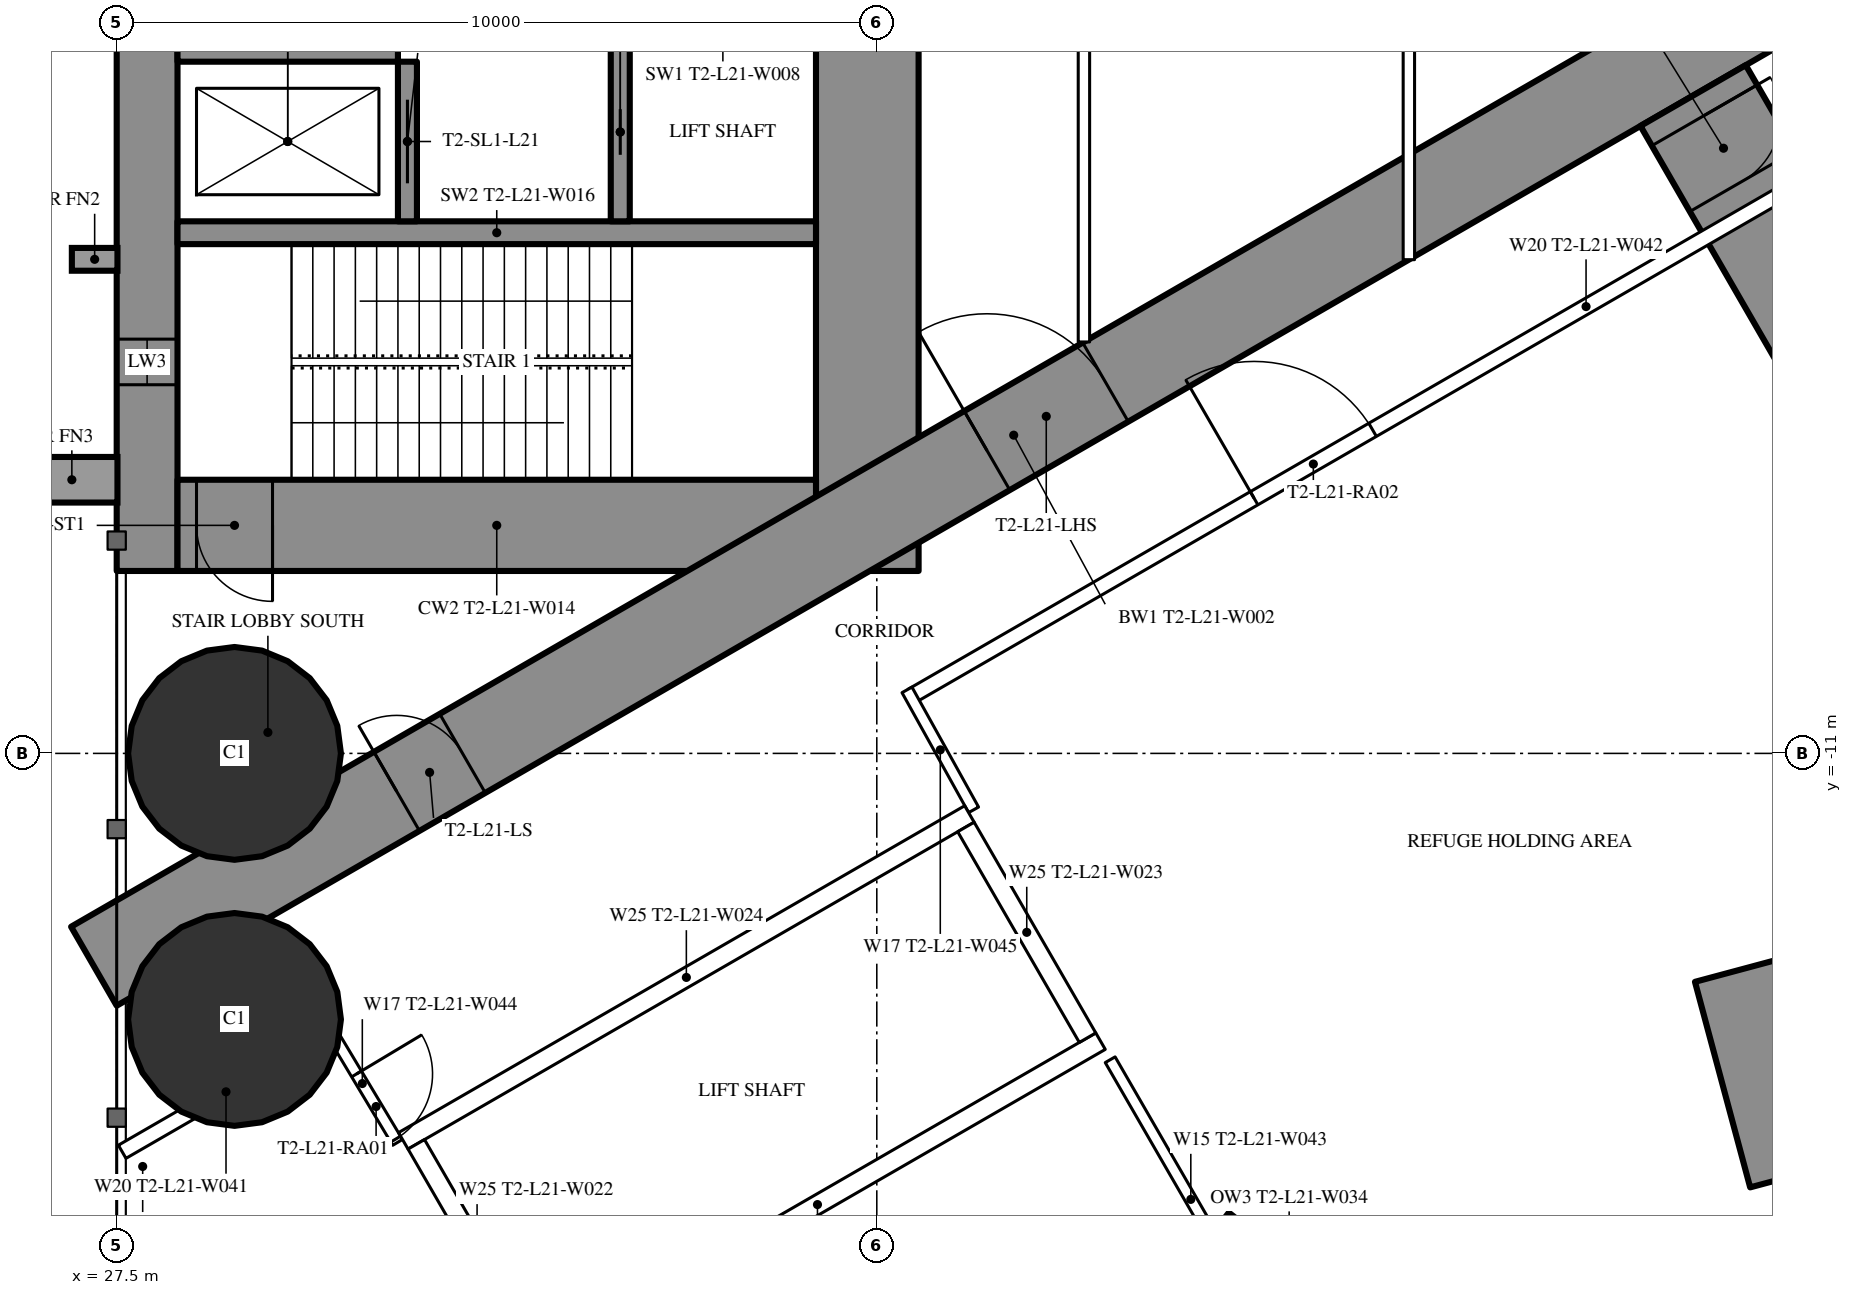
"""IFC4 building model, lengths in metres.
Left out: names, types, materials, properties, quantities, classifications, styles, units other than length and angle.
Written with IfcOpenShell. Run it as: python <this file> out.ifc"""

import sys

from ifc_helpers import new_model, si_unit, direction, frame, frame_2d, origin, origin_2d, place, context, subcontext, project, spatial, rectangle, hollow_circle, extrude, element, fill, save


model = new_model("IFC4")
c1 = context("Model", 3, precision=1e-05, world=origin(), true_north=direction((0.0, 1.0)))
c2 = subcontext(c1, "Body", "Model", "MODEL_VIEW")
j1 = project(units=[si_unit("LENGTHUNIT", "METRE"), si_unit("PLANEANGLEUNIT", "RADIAN")], contexts=[c1])
p1 = place(None, origin())
s1 = spatial("IfcSite", under=j1, at=p1, CompositionType="ELEMENT")
p2 = place(p1, origin())
s2 = spatial("IfcBuilding", under=s1, at=p2, CompositionType="ELEMENT")
p3 = place(p2, frame((0.0, 0.0, 81.0)))
s3 = spatial("IfcBuildingStorey", under=s2, at=p3, CompositionType="ELEMENT", Elevation=81.0)
for number, where, z_axis, x_axis in (
    (1, (29.05, -11.0, 0.0), (0.0, 0.0, 1.0), (1.0, 0.0, 0.0)),
    (2, (29.05, -14.5, 0.0), (0.0, 0.0, 1.0), (1.0, 0.0, 0.0)),
):
    element("IfcColumn", number, at=place(p3, frame(where, z_axis=z_axis, x_axis=x_axis)), inside=s3, PredefinedType="COLUMN", context=c2, shape_type="SweptSolid", body=[
        extrude(hollow_circle(Radius=1.4, WallThickness=0.12, at=origin_2d()), origin(), (0.0, 0.0, 1.0), 6.0),
    ])
p4 = place(p3, frame((44.584, -20.752, 0.0), z_axis=(0.0, 0.0, 1.0), x_axis=(-0.785936955348, 0.618306640931, 0.0)))
e3 = element("IfcWall", 3, at=p4, inside=s3, PredefinedType="SHEAR", context=c2, shape_type="SweptSolid", body=[
    extrude(rectangle(XDim=4.222, YDim=2.8, at=frame_2d((2.111, 0.0))), origin(), (0.0, 0.0, 1.0), 6.0),
])
p5 = place(p3, frame((56.147, -13.337, 0.0), z_axis=(0.0, 0.0, 1.0), x_axis=(-0.965766047912, -0.259414611578, 0.0)))
e4 = element("IfcWall", 4, at=p5, inside=s3, PredefinedType="SHEAR", context=c2, shape_type="SweptSolid", body=[
    extrude(rectangle(XDim=7.787, YDim=2.8, at=frame_2d((3.894, 0.0))), origin(), (0.0, 0.0, 1.0), 6.0),
])
p6 = place(p3, frame((27.9, -8.6, 0.0), z_axis=(0.0, 0.0, 1.0), x_axis=(0.0, 1.0, 0.0)))
e5 = element("IfcWall", 5, at=p6, inside=s3, PredefinedType="SHEAR", context=c2, shape_type="SweptSolid", body=[
    extrude(rectangle(XDim=17.2, YDim=0.8, at=frame_2d((8.6, 0.0))), origin(), (0.0, 0.0, 1.0), 6.0),
])
p7 = place(p6, frame((2.45, 0.0, 0.6)))
e6 = element("IfcOpeningElement", 6, at=p7, cuts=e5, PredefinedType="OPENING", context=c2, shape_type="SweptSolid", body=[
    extrude(rectangle(XDim=0.6, YDim=4.5, at=frame_2d((0.3, 2.25))), frame((0.0, 0.41, 0.0), z_axis=(0.0, -1.0, 0.0), x_axis=(1.0, 0.0, 0.0)), (0.0, 0.0, 1.0), 0.82),
])
p8 = place(p6, frame((14.15, 0.0, 0.6)))
e7 = element("IfcOpeningElement", 7, at=p8, cuts=e5, PredefinedType="OPENING", context=c2, shape_type="SweptSolid", body=[
    extrude(rectangle(XDim=0.6, YDim=4.5, at=frame_2d((0.3, 2.25))), frame((0.0, 0.41, 0.0), z_axis=(0.0, -1.0, 0.0), x_axis=(1.0, 0.0, 0.0)), (0.0, 0.0, 1.0), 0.82),
])
p9 = place(p3, frame((37.375, -8.6, 0.0), z_axis=(0.0, 0.0, 1.0), x_axis=(0.0, 1.0, 0.0)))
e8 = element("IfcWall", 8, at=p9, inside=s3, PredefinedType="SHEAR", context=c2, shape_type="SweptSolid", body=[
    extrude(rectangle(XDim=17.2, YDim=1.35, at=frame_2d((8.6, 0.0))), origin(), (0.0, 0.0, 1.0), 6.0),
])
p10 = place(p9, frame((7.7, 0.0, 0.0)))
e9 = element("IfcOpeningElement", 9, at=p10, cuts=e8, PredefinedType="OPENING", context=c2, shape_type="SweptSolid", body=[
    extrude(rectangle(XDim=1.8, YDim=2.2, at=frame_2d((0.9, 1.1))), frame((0.0, 0.685, 0.0), z_axis=(0.0, -1.0, 0.0), x_axis=(1.0, 0.0, 0.0)), (0.0, 0.0, 1.0), 1.37),
])
p11 = place(p3, frame((28.3, -8.0, 0.0), z_axis=(0.0, 0.0, 1.0), x_axis=(1.0, 0.0, 0.0)))
e10 = element("IfcWall", 10, at=p11, inside=s3, PredefinedType="SHEAR", context=c2, shape_type="SweptSolid", body=[
    extrude(rectangle(XDim=8.4, YDim=1.2, at=frame_2d((4.2, 0.0))), origin(), (0.0, 0.0, 1.0), 6.0),
])
p12 = place(p11, frame((0.25, 0.0, 0.0)))
e11 = element("IfcOpeningElement", 11, at=p12, cuts=e10, PredefinedType="OPENING", context=c2, shape_type="SweptSolid", body=[
    extrude(rectangle(XDim=1.0, YDim=2.2, at=frame_2d((0.5, 1.1))), frame((0.0, 0.61, 0.0), z_axis=(0.0, -1.0, 0.0), x_axis=(1.0, 0.0, 0.0)), (0.0, 0.0, 1.0), 1.22),
])
p13 = place(p3, frame((28.3, -4.15, 0.0), z_axis=(0.0, 0.0, 1.0), x_axis=(1.0, 0.0, 0.0)))
e12 = element("IfcWall", 12, at=p13, inside=s3, PredefinedType="SHEAR", context=c2, shape_type="SweptSolid", body=[
    extrude(rectangle(XDim=8.4, YDim=0.3, at=frame_2d((4.2, 0.0))), origin(), (0.0, 0.0, 1.0), 6.0),
])
p14 = place(p3, frame((31.325, -4.0, 0.0), z_axis=(0.0, 0.0, 1.0), x_axis=(0.0, 1.0, 0.0)))
e13 = element("IfcWall", 13, at=p14, inside=s3, PredefinedType="SHEAR", context=c2, shape_type="SweptSolid", body=[
    extrude(rectangle(XDim=2.1, YDim=0.25, at=frame_2d((1.05, 0.0))), origin(), (0.0, 0.0, 1.0), 6.0),
])
p15 = place(p14, frame((0.5, 0.0, 0.0)))
e14 = element("IfcOpeningElement", 14, at=p15, cuts=e13, PredefinedType="OPENING", context=c2, shape_type="SweptSolid", body=[
    extrude(rectangle(XDim=1.1, YDim=2.2, at=frame_2d((0.55, 1.1))), frame((0.0, 0.135, 0.0), z_axis=(0.0, -1.0, 0.0), x_axis=(1.0, 0.0, 0.0)), (0.0, 0.0, 1.0), 0.27),
])
p16 = place(p3, frame((34.125, -4.0, 0.0), z_axis=(0.0, 0.0, 1.0), x_axis=(0.0, 1.0, 0.0)))
e15 = element("IfcWall", 15, at=p16, inside=s3, PredefinedType="SHEAR", context=c2, shape_type="SweptSolid", body=[
    extrude(rectangle(XDim=2.35, YDim=0.25, at=frame_2d((1.175, 0.0))), origin(), (0.0, 0.0, 1.0), 6.0),
])
p17 = place(p16, frame((0.875, 0.0, 0.0)))
e16 = element("IfcOpeningElement", 16, at=p17, cuts=e15, PredefinedType="OPENING", context=c2, shape_type="SweptSolid", body=[
    extrude(rectangle(XDim=0.6, YDim=2.0, at=frame_2d((0.3, 1.0))), frame((0.0, 0.135, 0.0), z_axis=(0.0, -1.0, 0.0), x_axis=(1.0, 0.0, 0.0)), (0.0, 0.0, 1.0), 0.27),
])
p18 = place(p3, frame((28.3, -1.775, 0.0), z_axis=(0.0, 0.0, 1.0), x_axis=(1.0, 0.0, 0.0)))
e17 = element("IfcWall", 17, at=p18, inside=s3, PredefinedType="SHEAR", context=c2, shape_type="SweptSolid", body=[
    extrude(rectangle(XDim=2.9, YDim=0.25, at=frame_2d((1.45, 0.0))), origin(), (0.0, 0.0, 1.0), 6.0),
])
p19 = place(p3, frame((27.2, -13.8, 0.0), z_axis=(0.0, 0.0, 1.0), x_axis=(0.866027159892, 0.499996958321, 0.0)))
e18 = element("IfcWall", 18, at=p19, inside=s3, PredefinedType="SHEAR", context=c2, shape_type="SweptSolid", body=[
    extrude(rectangle(XDim=27.947, YDim=1.2, at=frame_2d((13.973, 0.0))), origin(), (0.0, 0.0, 1.0), 6.0),
])
p20 = place(p19, frame((4.6, 0.0, 0.0)))
e19 = element("IfcOpeningElement", 19, at=p20, cuts=e18, PredefinedType="OPENING", context=c2, shape_type="SweptSolid", body=[
    extrude(rectangle(XDim=1.0, YDim=2.2, at=frame_2d((0.5, 1.1))), frame((0.0, 0.61, 0.0), z_axis=(0.0, -1.0, 0.0), x_axis=(1.0, 0.0, 0.0)), (0.0, 0.0, 1.0), 1.22),
])
p21 = place(p19, frame((13.568, 0.0, 0.0)))
e20 = element("IfcOpeningElement", 20, at=p21, cuts=e18, PredefinedType="OPENING", context=c2, shape_type="SweptSolid", body=[
    extrude(rectangle(XDim=1.8, YDim=2.2, at=frame_2d((0.9, 1.1))), frame((0.0, 0.61, 0.0), z_axis=(0.0, -1.0, 0.0), x_axis=(1.0, 0.0, 0.0)), (0.0, 0.0, 1.0), 1.22),
])
p22 = place(p3, frame((48.239, -2.346, 0.0), z_axis=(0.0, 0.0, 1.0), x_axis=(0.500006130383, -0.866021864377, 0.0)))
e21 = element("IfcWall", 21, at=p22, inside=s3, PredefinedType="SHEAR", context=c2, shape_type="SweptSolid", body=[
    extrude(rectangle(XDim=13.112, YDim=1.6, at=frame_2d((6.556, 0.0))), origin(), (0.0, 0.0, 1.0), 6.0),
])
p23 = place(p22, frame((0.3, 0.0, 0.0)))
e22 = element("IfcOpeningElement", 22, at=p23, cuts=e21, PredefinedType="OPENING", context=c2, shape_type="SweptSolid", body=[
    extrude(rectangle(XDim=1.0, YDim=2.2, at=frame_2d((0.5, 1.1))), frame((0.0, 0.81, 0.0), z_axis=(0.0, -1.0, 0.0), x_axis=(1.0, 0.0, 0.0)), (0.0, 0.0, 1.0), 1.62),
])
p24 = place(p3, frame((40.57, -15.03, 0.0), z_axis=(0.0, 0.0, 1.0), x_axis=(0.500012993597, -0.866017901798, 0.0)))
e23 = element("IfcWall", 23, at=p24, inside=s3, PredefinedType="PARTITIONING", context=c2, shape_type="SweptSolid", body=[
    extrude(rectangle(XDim=4.243, YDim=0.15, at=frame_2d((2.122, 0.0))), origin(), (0.0, 0.0, 1.0), 5.75),
])
p25 = place(p3, frame((27.572, -16.241, 0.0), z_axis=(0.0, 0.0, 1.0), x_axis=(0.866029654818, 0.499992636921, 0.0)))
e24 = element("IfcWall", 24, at=p25, inside=s3, PredefinedType="PARTITIONING", context=c2, shape_type="SweptSolid", body=[
    extrude(rectangle(XDim=3.155, YDim=0.2, at=frame_2d((1.577, 0.0))), origin(), (0.0, 0.0, 1.0), 5.75),
])
p26 = place(p3, frame((37.96, -10.243, 0.0), z_axis=(0.0, 0.0, 1.0), x_axis=(0.866026429433, 0.499998223521, 0.0)))
e25 = element("IfcWall", 25, at=p26, inside=s3, PredefinedType="PARTITIONING", context=c2, shape_type="SweptSolid", body=[
    extrude(rectangle(XDim=20.487, YDim=0.2, at=frame_2d((10.243, 0.0))), origin(), (0.0, 0.0, 1.0), 5.75),
])
p27 = place(p26, frame((14.943, 0.0, 0.0)))
e26 = element("IfcOpeningElement", 26, at=p27, cuts=e25, PredefinedType="OPENING", context=c2, shape_type="SweptSolid", body=[
    extrude(rectangle(XDim=1.8, YDim=2.2, at=frame_2d((0.9, 1.1))), frame((0.0, 0.11, 0.0), z_axis=(0.0, -1.0, 0.0), x_axis=(1.0, 0.0, 0.0)), (0.0, 0.0, 1.0), 0.22),
])
p28 = place(p26, frame((5.2, 0.0, 0.0)))
e27 = element("IfcOpeningElement", 27, at=p28, cuts=e25, PredefinedType="OPENING", context=c2, shape_type="SweptSolid", body=[
    extrude(rectangle(XDim=1.8, YDim=2.2, at=frame_2d((0.9, 1.1))), frame((0.0, 0.11, 0.0), z_axis=(0.0, -1.0, 0.0), x_axis=(1.0, 0.0, 0.0)), (0.0, 0.0, 1.0), 0.22),
])
p29 = place(p3, frame((30.267, -14.569, 0.0), z_axis=(0.0, 0.0, 1.0), x_axis=(0.514336634837, -0.857588377991, 0.0)))
e28 = element("IfcWall", 28, at=p29, inside=s3, PredefinedType="PARTITIONING", context=c2, shape_type="SweptSolid", body=[
    extrude(rectangle(XDim=1.805, YDim=0.15, at=frame_2d((0.903, 0.0))), origin(), (0.0, 0.0, 1.0), 2.75),
])
p30 = place(p29, frame((0.755, 0.0, 0.0)))
e29 = element("IfcOpeningElement", 29, at=p30, cuts=e28, PredefinedType="OPENING", context=c2, shape_type="SweptSolid", body=[
    extrude(rectangle(XDim=1.0, YDim=2.2, at=frame_2d((0.5, 1.1))), frame((0.0, 0.085, 0.0), z_axis=(0.0, -1.0, 0.0), x_axis=(1.0, 0.0, 0.0)), (0.0, 0.0, 1.0), 0.17),
])
p31 = place(p3, frame((38.773, -11.742, 0.0), z_axis=(0.0, 0.0, 1.0), x_axis=(-0.485528096672, 0.8742210632, 0.0)))
e30 = element("IfcWall", 30, at=p31, inside=s3, PredefinedType="PARTITIONING", context=c2, shape_type="SweptSolid", body=[
    extrude(rectangle(XDim=1.805, YDim=0.15, at=frame_2d((0.903, 0.0))), origin(), (0.0, 0.0, 1.0), 5.75),
])
p32 = place(p3, frame((40.225, -5.587, 0.0), z_axis=(0.0, 0.0, 1.0), x_axis=(0.0, 1.0, 0.0)))
e31 = element("IfcWall", 31, at=p32, inside=s3, PredefinedType="PARTITIONING", context=c2, shape_type="SweptSolid", body=[
    extrude(rectangle(XDim=11.174, YDim=0.15, at=frame_2d((5.587, 0.0))), origin(), (0.0, 0.0, 1.0), 5.75),
])
p33 = place(p32, frame((4.687, 0.0, 0.0)))
e32 = element("IfcOpeningElement", 32, at=p33, cuts=e31, PredefinedType="OPENING", context=c2, shape_type="SweptSolid", body=[
    extrude(rectangle(XDim=1.8, YDim=2.2, at=frame_2d((0.9, 1.1))), frame((0.0, 0.085, 0.0), z_axis=(0.0, -1.0, 0.0), x_axis=(1.0, 0.0, 0.0)), (0.0, 0.0, 1.0), 0.17),
])
p34 = place(p3, frame((44.5, -4.505, 0.0), z_axis=(0.0, 0.0, 1.0), x_axis=(0.0, 1.0, 0.0)))
e33 = element("IfcWall", 33, at=p34, inside=s3, PredefinedType="PARTITIONING", context=c2, shape_type="SweptSolid", body=[
    extrude(rectangle(XDim=9.009, YDim=0.15, at=frame_2d((4.505, 0.0))), origin(), (0.0, 0.0, 1.0), 5.75),
])
p35 = place(p34, frame((4.005, 0.0, 0.0)))
e34 = element("IfcOpeningElement", 34, at=p35, cuts=e33, PredefinedType="OPENING", context=c2, shape_type="SweptSolid", body=[
    extrude(rectangle(XDim=1.0, YDim=2.2, at=frame_2d((0.5, 1.1))), frame((0.0, 0.085, 0.0), z_axis=(0.0, -1.0, 0.0), x_axis=(1.0, 0.0, 0.0)), (0.0, 0.0, 1.0), 0.17),
])
for number, where, z_axis, x_axis in (
    (35, (31.271, -16.097, 0.0), (0.0, 0.0, 1.0), (0.866, 0.5, 0.0)),
    (36, (32.996, -19.086, 0.0), (0.0, 0.0, 1.0), (0.866, 0.5, 0.0)),
):
    element("IfcWall", number, at=place(p3, frame(where, z_axis=z_axis, x_axis=x_axis)), inside=s3, PredefinedType="PARTITIONING", context=c2, shape_type="SweptSolid", body=[
        extrude(rectangle(XDim=8.6, YDim=0.25, at=frame_2d((4.3, 0.0))), origin(), (0.0, 0.0, 1.0), 5.75),
    ])
for number, where, z_axis, x_axis in (
    (37, (31.441, -16.143, 0.0), (0.0, 0.0, 1.0), (0.5, -0.866, 0.0)),
    (38, (38.673, -11.968, 0.0), (0.0, 0.0, 1.0), (0.5, -0.866, 0.0)),
):
    element("IfcWall", number, at=place(p3, frame(where, z_axis=z_axis, x_axis=x_axis)), inside=s3, PredefinedType="PARTITIONING", context=c2, shape_type="SweptSolid", body=[
        extrude(rectangle(XDim=3.201, YDim=0.25, at=frame_2d((1.6, 0.0))), origin(), (0.0, 0.0, 1.0), 5.75),
    ])
p36 = place(p23, origin())
e39 = element("IfcDoor", 39, at=p36, inside=s3, OperationType="SINGLE_SWING_LEFT", PredefinedType="DOOR", context=c2, shape_type="SweptSolid", body=[
    extrude(rectangle(XDim=1.0, YDim=2.2, at=frame_2d((0.5, 1.1))), frame((0.0, 0.025, 0.0), z_axis=(0.0, -1.0, 0.0), x_axis=(1.0, 0.0, 0.0)), (0.0, 0.0, 1.0), 0.05),
])
fill(e22, e39)
p37 = place(p30, origin())
e40 = element("IfcDoor", 40, at=p37, inside=s3, OperationType="SINGLE_SWING_LEFT", PredefinedType="DOOR", context=c2, shape_type="SweptSolid", body=[
    extrude(rectangle(XDim=1.0, YDim=2.2, at=frame_2d((0.5, 1.1))), frame((0.0, 0.025, 0.0), z_axis=(0.0, -1.0, 0.0), x_axis=(1.0, 0.0, 0.0)), (0.0, 0.0, 1.0), 0.05),
])
fill(e29, e40)
p38 = place(p28, origin())
e41 = element("IfcDoor", 41, at=p38, inside=s3, OperationType="DOUBLE_DOOR_SINGLE_SWING", PredefinedType="DOOR", context=c2, shape_type="SweptSolid", body=[
    extrude(rectangle(XDim=1.8, YDim=2.2, at=frame_2d((0.9, 1.1))), frame((0.0, 0.025, 0.0), z_axis=(0.0, -1.0, 0.0), x_axis=(1.0, 0.0, 0.0)), (0.0, 0.0, 1.0), 0.05),
])
fill(e27, e41)
p39 = place(p20, origin())
e42 = element("IfcDoor", 42, at=p39, inside=s3, OperationType="SINGLE_SWING_LEFT", PredefinedType="DOOR", context=c2, shape_type="SweptSolid", body=[
    extrude(rectangle(XDim=1.0, YDim=2.2, at=frame_2d((0.5, 1.1))), frame((0.0, 0.025, 0.0), z_axis=(0.0, -1.0, 0.0), x_axis=(1.0, 0.0, 0.0)), (0.0, 0.0, 1.0), 0.05),
])
fill(e19, e42)
p40 = place(p21, origin())
e43 = element("IfcDoor", 43, at=p40, inside=s3, OperationType="DOUBLE_DOOR_SINGLE_SWING", PredefinedType="DOOR", context=c2, shape_type="SweptSolid", body=[
    extrude(rectangle(XDim=1.8, YDim=2.2, at=frame_2d((0.9, 1.1))), frame((0.0, 0.025, 0.0), z_axis=(0.0, -1.0, 0.0), x_axis=(1.0, 0.0, 0.0)), (0.0, 0.0, 1.0), 0.05),
])
fill(e20, e43)
p41 = place(p12, origin())
e44 = element("IfcDoor", 44, at=p41, inside=s3, OperationType="SINGLE_SWING_RIGHT", PredefinedType="DOOR", context=c2, shape_type="SweptSolid", body=[
    extrude(rectangle(XDim=1.0, YDim=2.2, at=frame_2d((0.5, 1.1))), frame((0.0, 0.025, 0.0), z_axis=(0.0, -1.0, 0.0), x_axis=(1.0, 0.0, 0.0)), (0.0, 0.0, 1.0), 0.05),
])
fill(e11, e44)
p42 = place(p15, origin())
e45 = element("IfcDoor", 45, at=p42, inside=s3, OperationType="SLIDING_TO_LEFT", PredefinedType="USERDEFINED", context=c2, shape_type="SweptSolid", body=[
    extrude(rectangle(XDim=1.1, YDim=2.2, at=frame_2d((0.55, 1.1))), frame((0.0, 0.025, 0.0), z_axis=(0.0, -1.0, 0.0), x_axis=(1.0, 0.0, 0.0)), (0.0, 0.0, 1.0), 0.05),
])
fill(e14, e45)
p43 = place(p17, origin())
e46 = element("IfcDoor", 46, at=p43, inside=s3, OperationType="SLIDING_TO_LEFT", PredefinedType="DOOR", context=c2, shape_type="SweptSolid", body=[
    extrude(rectangle(XDim=0.6, YDim=2.0, at=frame_2d((0.3, 1.0))), frame((0.0, 0.025, 0.0), z_axis=(0.0, -1.0, 0.0), x_axis=(1.0, 0.0, 0.0)), (0.0, 0.0, 1.0), 0.05),
])
fill(e16, e46)
p44 = place(p7, origin())
e47 = element("IfcWindow", 47, at=p44, inside=s3, PartitioningType="SINGLE_PANEL", PredefinedType="WINDOW", context=c2, shape_type="SweptSolid", body=[
    extrude(rectangle(XDim=0.6, YDim=4.5, at=frame_2d((0.3, 2.25))), frame((0.0, 0.03, 0.0), z_axis=(0.0, -1.0, 0.0), x_axis=(1.0, 0.0, 0.0)), (0.0, 0.0, 1.0), 0.06),
])
fill(e6, e47)
save(model, sys.argv[1])
